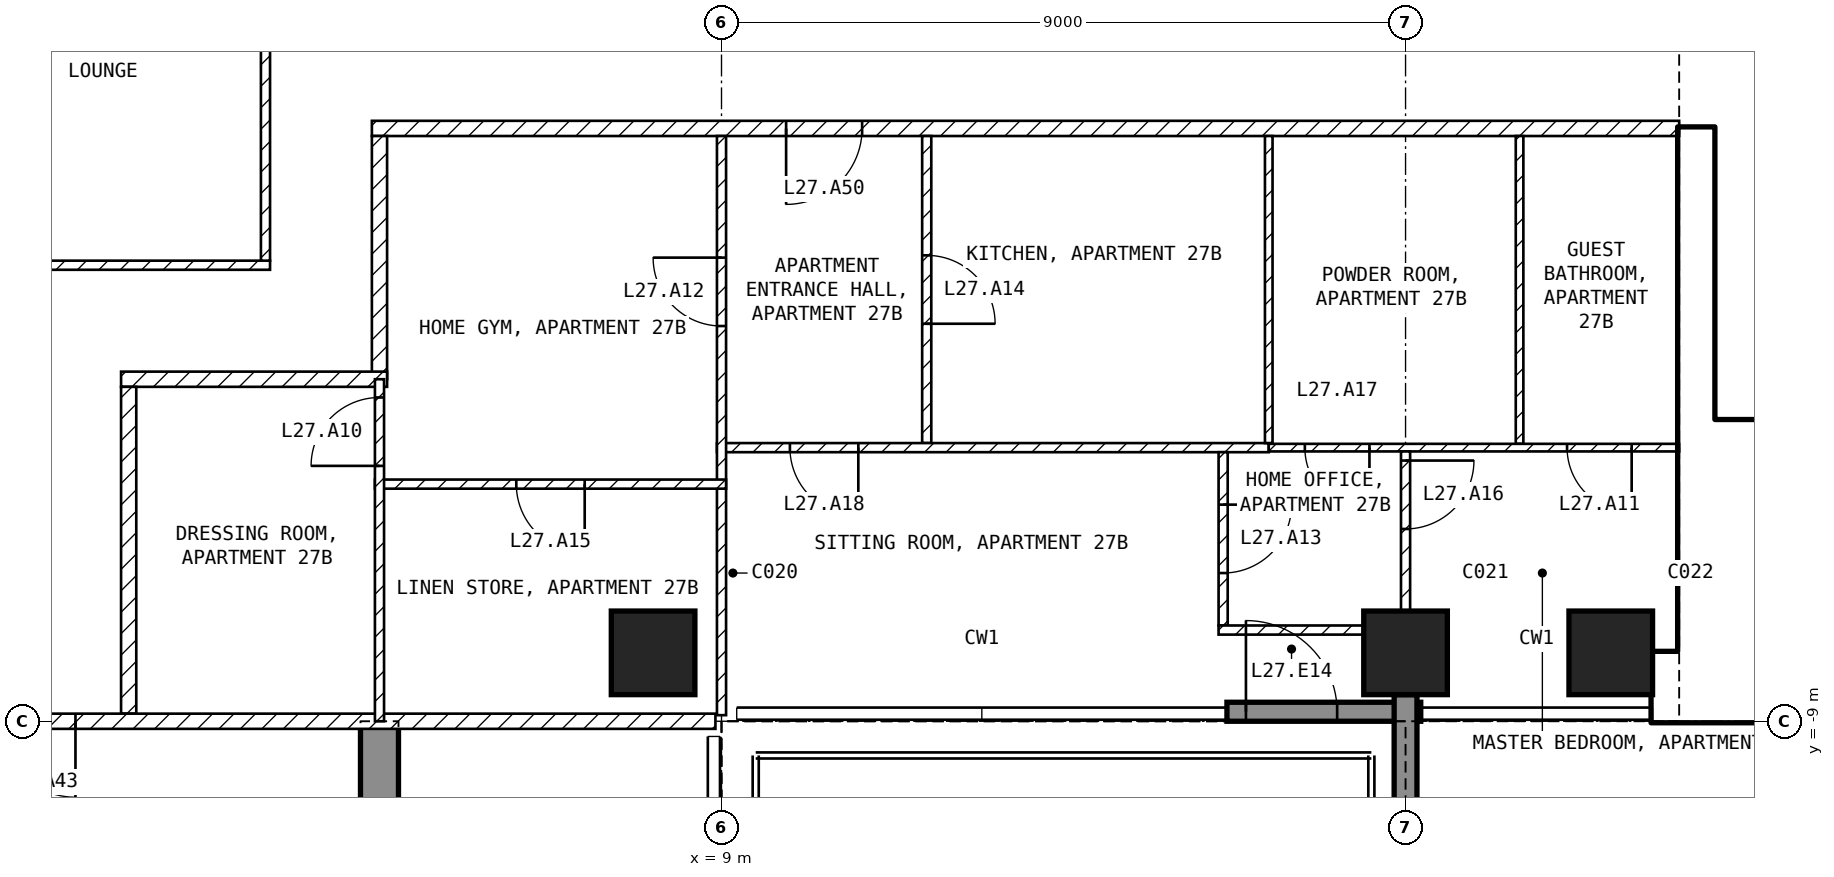
"""IFC4 building model, lengths in metres.
Left out: names, types, materials, properties, quantities, classifications, styles, units other than length and angle.
Written with IfcOpenShell. Run it as: python <this file> out.ifc"""

import sys

from ifc_helpers import new_model, si_unit, direction, frame, frame_2d, origin, origin_2d, place, context, subcontext, project, spatial, polyline, rectangle, outline, extrude, element, fill, save


model = new_model("IFC4")
c1 = context("Model", 3, precision=1e-05, world=origin(), true_north=direction((0.0, 1.0)))
c2 = subcontext(c1, "Body", "Model", "MODEL_VIEW")
j1 = project(units=[si_unit("LENGTHUNIT", "METRE"), si_unit("PLANEANGLEUNIT", "RADIAN")], contexts=[c1])
p1 = place(None, origin())
s1 = spatial("IfcSite", under=j1, at=p1, CompositionType="ELEMENT")
p2 = place(p1, origin())
s2 = spatial("IfcBuilding", under=s1, at=p2, CompositionType="ELEMENT")
p3 = place(p2, frame((0.0, 0.0, 116.4)))
s3 = spatial("IfcBuildingStorey", under=s2, at=p3, CompositionType="ELEMENT", Elevation=116.4)
for number, where, z_axis, x_axis in (
    (1, (8.1, -8.1, -0.25), (0.0, 0.0, 1.0), (1.0, 0.0, 0.0)),
    (2, (18.0, -8.1, -0.25), (0.0, 0.0, 1.0), (1.0, 0.0, 0.0)),
    (3, (20.7, -8.1, -0.25), (0.0, 0.0, 1.0), (1.0, 0.0, 0.0)),
):
    element("IfcColumn", number, at=place(p3, frame(where, z_axis=z_axis, x_axis=x_axis)), inside=s3, PredefinedType="COLUMN", context=c2, shape_type="SweptSolid", body=[
        extrude(rectangle(XDim=1.1, YDim=1.1, at=origin_2d()), origin(), (0.0, 0.0, 1.0), 3.5),
    ])
p4 = place(p3, frame((4.25, -20.15, -0.25), z_axis=(1.0, 0.0, 0.0), x_axis=(0.0, 1.0, 0.0)))
e4 = element("IfcWall", 4, at=p4, inside=s3, PredefinedType="SHEAR", context=c2, shape_type="SweptSolid", body=[
    extrude(outline(polyline([(0.0, 0.0), (6.65, 0.0), (6.65, 2.65), (9.05, 2.65), (9.05, 0.0), (11.15, 0.0), (11.15, 3.5), (0.0, 3.5), (0.0, 0.0)])), origin(), (0.0, 0.0, 1.0), 0.5),
])
p5 = place(p3, frame((15.65, -8.875, 0.0), z_axis=(0.0, 0.0, 1.0), x_axis=(1.0, 0.0, 0.0)))
e5 = element("IfcWall", 5, at=p5, inside=s3, PredefinedType="SOLIDWALL", context=c2, shape_type="SweptSolid", body=[
    extrude(rectangle(XDim=2.55, YDim=0.25, at=frame_2d((1.275, 0.0))), origin(), (0.0, 0.0, 1.0), 3.25),
])
p6 = place(p5, frame((0.25, 0.0, 0.0)))
e6 = element("IfcOpeningElement", 6, at=p6, cuts=e5, PredefinedType="OPENING", context=c2, shape_type="SweptSolid", body=[
    extrude(rectangle(XDim=1.2, YDim=2.4, at=frame_2d((0.6, 1.2))), frame((0.0, 0.135, 0.0), z_axis=(0.0, -1.0, 0.0), x_axis=(1.0, 0.0, 0.0)), (0.0, 0.0, 1.0), 0.27),
])
p7 = place(p3, frame((18.0, -8.65, 0.0), z_axis=(0.0, 0.0, 1.0), x_axis=(0.0, -1.0, 0.0)))
e7 = element("IfcWall", 7, at=p7, inside=s3, PredefinedType="SOLIDWALL", context=c2, shape_type="SweptSolid", body=[
    extrude(rectangle(XDim=3.09, YDim=0.3, at=frame_2d((1.545, 0.0))), origin(), (0.0, 0.0, 1.0), 3.25),
])
p8 = place(p3, frame((21.25, -8.55, 0.0), z_axis=(0.0, 0.0, 1.0), x_axis=(1.0, 0.0, 0.0)))
e8 = element("IfcWall", 8, at=p8, inside=s3, PredefinedType="SHEAR", context=c2, shape_type="SweptSolid", body=[
    extrude(rectangle(XDim=8.95, YDim=0.9, at=frame_2d((4.475, 0.0))), origin(), (0.0, 0.0, 1.0), 3.25),
])
p9 = place(p3, frame((21.825, -8.1, 0.0), z_axis=(0.0, 0.0, 1.0), x_axis=(0.0, 1.0, 0.0)))
e9 = element("IfcWall", 9, at=p9, inside=s3, PredefinedType="SHEAR", context=c2, shape_type="SweptSolid", body=[
    extrude(rectangle(XDim=6.9, YDim=0.45, at=frame_2d((3.45, 0.0))), origin(), (0.0, 0.0, 1.0), 3.25),
])
p10 = place(p3, frame((22.05, -5.15, 0.0), z_axis=(0.0, 0.0, 1.0), x_axis=(1.0, 0.0, 0.0)))
e10 = element("IfcWall", 10, at=p10, inside=s3, PredefinedType="SOLIDWALL", context=c2, shape_type="SweptSolid", body=[
    extrude(rectangle(XDim=6.3, YDim=0.2, at=frame_2d((3.15, 0.0))), origin(), (0.0, 0.0, 1.0), 3.25),
])
p11 = place(p10, frame((0.2, 0.0, 0.0)))
e11 = element("IfcOpeningElement", 11, at=p11, cuts=e10, PredefinedType="OPENING", context=c2, shape_type="SweptSolid", body=[
    extrude(rectangle(XDim=1.0, YDim=2.1, at=frame_2d((0.5, 1.05))), frame((0.0, 0.11, 0.0), z_axis=(0.0, -1.0, 0.0), x_axis=(1.0, 0.0, 0.0)), (0.0, 0.0, 1.0), 0.22),
])
p12 = place(p3, frame((-3.06, -3.0, 0.0), z_axis=(0.0, 0.0, 1.0), x_axis=(1.0, 0.0, 0.0)))
e12 = element("IfcWall", 12, at=p12, inside=s3, PredefinedType="PARTITIONING", context=c2, shape_type="SweptSolid", body=[
    extrude(rectangle(XDim=6.12, YDim=0.12, at=frame_2d((3.06, 0.0))), origin(), (0.0, 0.0, 1.0), 3.25),
])
p13 = place(p3, frame((3.0, -2.94, 0.0), z_axis=(0.0, 0.0, 1.0), x_axis=(0.0, 1.0, 0.0)))
e13 = element("IfcWall", 13, at=p13, inside=s3, PredefinedType="PARTITIONING", context=c2, shape_type="SweptSolid", body=[
    extrude(rectangle(XDim=5.88, YDim=0.12, at=frame_2d((2.94, 0.0))), origin(), (0.0, 0.0, 1.0), 3.25),
])
p14 = place(p3, frame((21.6, -1.2, 0.0), z_axis=(0.0, 0.0, 1.0), x_axis=(-1.0, 0.0, 0.0)))
e14 = element("IfcWall", 14, at=p14, inside=s3, PredefinedType="PARTITIONING", context=c2, shape_type="SweptSolid", body=[
    extrude(rectangle(XDim=17.2, YDim=0.2, at=frame_2d((8.6, 0.0))), origin(), (0.0, 0.0, 1.0), 3.25),
])
p15 = place(p14, frame((10.75, 0.0, 0.0)))
e15 = element("IfcOpeningElement", 15, at=p15, cuts=e14, PredefinedType="OPENING", context=c2, shape_type="SweptSolid", body=[
    extrude(rectangle(XDim=1.0, YDim=2.1, at=frame_2d((0.5, 1.05))), frame((0.0, 0.11, 0.0), z_axis=(0.0, -1.0, 0.0), x_axis=(1.0, 0.0, 0.0)), (0.0, 0.0, 1.0), 0.22),
])
p16 = place(p3, frame((4.5, -1.3, 0.0), z_axis=(0.0, 0.0, 1.0), x_axis=(0.0, -1.0, 0.0)))
e16 = element("IfcWall", 16, at=p16, inside=s3, PredefinedType="PARTITIONING", context=c2, shape_type="SweptSolid", body=[
    extrude(rectangle(XDim=3.2, YDim=0.2, at=frame_2d((1.6, 0.0))), origin(), (0.0, 0.0, 1.0), 3.25),
])
p17 = place(p3, frame((4.6, -4.5, 0.0), z_axis=(0.0, 0.0, 1.0), x_axis=(-1.0, 0.0, 0.0)))
e17 = element("IfcWall", 17, at=p17, inside=s3, PredefinedType="PARTITIONING", context=c2, shape_type="SweptSolid", body=[
    extrude(rectangle(XDim=3.5, YDim=0.2, at=frame_2d((1.75, 0.0))), origin(), (0.0, 0.0, 1.0), 3.25),
])
p18 = place(p3, frame((1.2, -4.6, 0.0), z_axis=(0.0, 0.0, 1.0), x_axis=(0.0, -1.0, 0.0)))
e18 = element("IfcWall", 18, at=p18, inside=s3, PredefinedType="PARTITIONING", context=c2, shape_type="SweptSolid", body=[
    extrude(rectangle(XDim=4.3, YDim=0.2, at=frame_2d((2.15, 0.0))), origin(), (0.0, 0.0, 1.0), 3.25),
])
p19 = place(p3, frame((8.92, -9.0, 0.0), z_axis=(0.0, 0.0, 1.0), x_axis=(-1.0, 0.0, 0.0)))
e19 = element("IfcWall", 19, at=p19, inside=s3, PredefinedType="PARTITIONING", context=c2, shape_type="SweptSolid", body=[
    extrude(rectangle(XDim=17.84, YDim=0.2, at=frame_2d((8.92, 0.0))), origin(), (0.0, 0.0, 1.0), 3.25),
])
p20 = place(p19, frame((8.42, 0.0, 0.0)))
e20 = element("IfcOpeningElement", 20, at=p20, cuts=e19, PredefinedType="OPENING", context=c2, shape_type="SweptSolid", body=[
    extrude(rectangle(XDim=1.0, YDim=2.1, at=frame_2d((0.5, 1.05))), frame((0.0, 0.11, 0.0), z_axis=(0.0, -1.0, 0.0), x_axis=(1.0, 0.0, 0.0)), (0.0, 0.0, 1.0), 0.22),
])
p21 = place(p3, frame((11.7, -1.3, 0.0), z_axis=(0.0, 0.0, 1.0), x_axis=(0.0, -1.0, 0.0)))
e21 = element("IfcWall", 21, at=p21, inside=s3, PredefinedType="PARTITIONING", context=c2, shape_type="SweptSolid", body=[
    extrude(rectangle(XDim=4.04, YDim=0.12, at=frame_2d((2.02, 0.0))), origin(), (0.0, 0.0, 1.0), 3.25),
])
p22 = place(p21, frame((1.57, 0.0, 0.0)))
e22 = element("IfcOpeningElement", 22, at=p22, cuts=e21, PredefinedType="OPENING", context=c2, shape_type="SweptSolid", body=[
    extrude(rectangle(XDim=0.9, YDim=2.1, at=frame_2d((0.45, 1.05))), frame((0.0, 0.07, 0.0), z_axis=(0.0, -1.0, 0.0), x_axis=(1.0, 0.0, 0.0)), (0.0, 0.0, 1.0), 0.14),
])
p23 = place(p3, frame((16.2, -5.4, 0.0), z_axis=(0.0, 0.0, 1.0), x_axis=(-1.0, 0.0, 0.0)))
e23 = element("IfcWall", 23, at=p23, inside=s3, PredefinedType="PARTITIONING", context=c2, shape_type="SweptSolid", body=[
    extrude(rectangle(XDim=7.26, YDim=0.12, at=frame_2d((3.63, 0.0))), origin(), (0.0, 0.0, 1.0), 3.25),
])
p24 = place(p23, frame((5.4, 0.0, 0.0)))
e24 = element("IfcOpeningElement", 24, at=p24, cuts=e23, PredefinedType="OPENING", context=c2, shape_type="SweptSolid", body=[
    extrude(rectangle(XDim=0.9, YDim=2.1, at=frame_2d((0.45, 1.05))), frame((0.0, 0.07, 0.0), z_axis=(0.0, -1.0, 0.0), x_axis=(1.0, 0.0, 0.0)), (0.0, 0.0, 1.0), 0.14),
])
p25 = place(p3, frame((9.0, -8.92, 0.0), z_axis=(0.0, 0.0, 1.0), x_axis=(0.0, 1.0, 0.0)))
e25 = element("IfcWall", 25, at=p25, inside=s3, PredefinedType="PARTITIONING", context=c2, shape_type="SweptSolid", body=[
    extrude(rectangle(XDim=7.62, YDim=0.12, at=frame_2d((3.81, 0.0))), origin(), (0.0, 0.0, 1.0), 3.25),
])
p26 = place(p25, frame((5.12, 0.0, 0.0)))
e26 = element("IfcOpeningElement", 26, at=p26, cuts=e25, PredefinedType="OPENING", context=c2, shape_type="SweptSolid", body=[
    extrude(rectangle(XDim=0.9, YDim=2.1, at=frame_2d((0.45, 1.05))), frame((0.0, 0.07, 0.0), z_axis=(0.0, -1.0, 0.0), x_axis=(1.0, 0.0, 0.0)), (0.0, 0.0, 1.0), 0.14),
])
p27 = place(p3, frame((16.2, -1.3, 0.0), z_axis=(0.0, 0.0, 1.0), x_axis=(0.0, -1.0, 0.0)))
e27 = element("IfcWall", 27, at=p27, inside=s3, PredefinedType="PARTITIONING", context=c2, shape_type="SweptSolid", body=[
    extrude(rectangle(XDim=4.04, YDim=0.1, at=frame_2d((2.02, 0.0))), origin(), (0.0, 0.0, 1.0), 3.25),
])
p28 = place(p3, frame((19.5, -1.3, 0.0), z_axis=(0.0, 0.0, 1.0), x_axis=(0.0, -1.0, 0.0)))
e28 = element("IfcWall", 28, at=p28, inside=s3, PredefinedType="PARTITIONING", context=c2, shape_type="SweptSolid", body=[
    extrude(rectangle(XDim=4.05, YDim=0.1, at=frame_2d((2.025, 0.0))), origin(), (0.0, 0.0, 1.0), 3.25),
])
p29 = place(p3, frame((21.6, -5.4, 0.0), z_axis=(0.0, 0.0, 1.0), x_axis=(-1.0, 0.0, 0.0)))
e29 = element("IfcWall", 29, at=p29, inside=s3, PredefinedType="PARTITIONING", context=c2, shape_type="SweptSolid", body=[
    extrude(rectangle(XDim=5.4, YDim=0.1, at=frame_2d((2.7, 0.0))), origin(), (0.0, 0.0, 1.0), 3.25),
])
p30 = place(p29, frame((0.625, 0.0, 0.0)))
e30 = element("IfcOpeningElement", 30, at=p30, cuts=e29, PredefinedType="OPENING", context=c2, shape_type="SweptSolid", body=[
    extrude(rectangle(XDim=0.85, YDim=2.1, at=frame_2d((0.425, 1.05))), frame((0.0, 0.06, 0.0), z_axis=(0.0, -1.0, 0.0), x_axis=(1.0, 0.0, 0.0)), (0.0, 0.0, 1.0), 0.12),
])
p31 = place(p29, frame((4.075, 0.0, 0.0)))
e31 = element("IfcOpeningElement", 31, at=p31, cuts=e29, PredefinedType="OPENING", context=c2, shape_type="SweptSolid", body=[
    extrude(rectangle(XDim=0.85, YDim=2.1, at=frame_2d((0.425, 1.05))), frame((0.0, 0.06, 0.0), z_axis=(0.0, -1.0, 0.0), x_axis=(1.0, 0.0, 0.0)), (0.0, 0.0, 1.0), 0.12),
])
p32 = place(p3, frame((15.6, -5.46, 0.0), z_axis=(0.0, 0.0, 1.0), x_axis=(0.0, -1.0, 0.0)))
e32 = element("IfcWall", 32, at=p32, inside=s3, PredefinedType="PARTITIONING", context=c2, shape_type="SweptSolid", body=[
    extrude(rectangle(XDim=2.28, YDim=0.12, at=frame_2d((1.14, 0.0))), origin(), (0.0, 0.0, 1.0), 3.25),
])
p33 = place(p32, frame((0.69, 0.0, 0.0)))
e33 = element("IfcOpeningElement", 33, at=p33, cuts=e32, PredefinedType="OPENING", context=c2, shape_type="SweptSolid", body=[
    extrude(rectangle(XDim=0.9, YDim=2.1, at=frame_2d((0.45, 1.05))), frame((0.0, 0.07, 0.0), z_axis=(0.0, -1.0, 0.0), x_axis=(1.0, 0.0, 0.0)), (0.0, 0.0, 1.0), 0.14),
])
p34 = place(p3, frame((15.54, -7.8, 0.0), z_axis=(0.0, 0.0, 1.0), x_axis=(1.0, 0.0, 0.0)))
e34 = element("IfcWall", 34, at=p34, inside=s3, PredefinedType="PARTITIONING", context=c2, shape_type="SweptSolid", body=[
    extrude(rectangle(XDim=1.91, YDim=0.12, at=frame_2d((0.955, 0.0))), origin(), (0.0, 0.0, 1.0), 3.25),
])
p35 = place(p3, frame((18.0, -5.45, 0.0), z_axis=(0.0, 0.0, 1.0), x_axis=(0.0, -1.0, 0.0)))
e35 = element("IfcWall", 35, at=p35, inside=s3, PredefinedType="PARTITIONING", context=c2, shape_type="SweptSolid", body=[
    extrude(rectangle(XDim=2.1, YDim=0.12, at=frame_2d((1.05, 0.0))), origin(), (0.0, 0.0, 1.0), 2.414),
])
p36 = place(p35, frame((0.12, 0.0, 0.0)))
e36 = element("IfcOpeningElement", 36, at=p36, cuts=e35, PredefinedType="OPENING", context=c2, shape_type="SweptSolid", body=[
    extrude(rectangle(XDim=0.9, YDim=2.1, at=frame_2d((0.45, 1.05))), frame((0.0, 0.07, 0.0), z_axis=(0.0, -1.0, 0.0), x_axis=(1.0, 0.0, 0.0)), (0.0, 0.0, 1.0), 0.14),
])
p37 = place(p3, frame((9.06, -5.88, 0.0), z_axis=(0.0, 0.0, 1.0), x_axis=(-1.0, 0.0, 0.0)))
e37 = element("IfcWall", 37, at=p37, inside=s3, PredefinedType="PARTITIONING", context=c2, shape_type="SweptSolid", body=[
    extrude(rectangle(XDim=4.62, YDim=0.12, at=frame_2d((2.31, 0.0))), origin(), (0.0, 0.0, 1.0), 3.25),
])
p38 = place(p37, frame((1.86, 0.0, 0.0)))
e38 = element("IfcOpeningElement", 38, at=p38, cuts=e37, PredefinedType="OPENING", context=c2, shape_type="SweptSolid", body=[
    extrude(rectangle(XDim=0.9, YDim=2.1, at=frame_2d((0.45, 1.05))), frame((0.0, 0.07, 0.0), z_axis=(0.0, -1.0, 0.0), x_axis=(1.0, 0.0, 0.0)), (0.0, 0.0, 1.0), 0.14),
])
p39 = place(p3, frame((4.5, -9.0, 0.0), z_axis=(0.0, 0.0, 1.0), x_axis=(0.0, 1.0, 0.0)))
e39 = element("IfcWall", 39, at=p39, inside=s3, PredefinedType="PARTITIONING", context=c2, shape_type="SweptSolid", body=[
    extrude(rectangle(XDim=4.5, YDim=0.12, at=frame_2d((2.25, 0.0))), origin(), (0.0, 0.0, 1.0), 3.25),
])
p40 = place(p39, frame((3.36, 0.0, 0.0)))
e40 = element("IfcOpeningElement", 40, at=p40, cuts=e39, PredefinedType="OPENING", context=c2, shape_type="SweptSolid", body=[
    extrude(rectangle(XDim=0.9, YDim=2.1, at=frame_2d((0.45, 1.05))), frame((0.0, 0.07, 0.0), z_axis=(0.0, -1.0, 0.0), x_axis=(1.0, 0.0, 0.0)), (0.0, 0.0, 1.0), 0.14),
])
p41 = place(p6, origin())
e41 = element("IfcDoor", 41, at=p41, inside=s3, OperationType="SINGLE_SWING_LEFT", PredefinedType="DOOR", context=c2, shape_type="SweptSolid", body=[
    extrude(rectangle(XDim=1.2, YDim=2.4, at=frame_2d((0.6, 1.2))), frame((0.0, 0.025, 0.0), z_axis=(0.0, -1.0, 0.0), x_axis=(1.0, 0.0, 0.0)), (0.0, 0.0, 1.0), 0.05),
])
fill(e6, e41)
p42 = place(p11, origin())
e42 = element("IfcDoor", 42, at=p42, inside=s3, OperationType="SINGLE_SWING_LEFT", PredefinedType="DOOR", context=c2, shape_type="SweptSolid", body=[
    extrude(rectangle(XDim=1.0, YDim=2.1, at=frame_2d((0.5, 1.05))), frame((0.0, 0.025, 0.0), z_axis=(0.0, -1.0, 0.0), x_axis=(1.0, 0.0, 0.0)), (0.0, 0.0, 1.0), 0.05),
])
fill(e11, e42)
p43 = place(p40, origin())
e43 = element("IfcDoor", 43, at=p43, inside=s3, OperationType="SINGLE_SWING_LEFT", PredefinedType="DOOR", context=c2, shape_type="SweptSolid", body=[
    extrude(rectangle(XDim=0.9, YDim=2.1, at=frame_2d((0.45, 1.05))), frame((0.0, 0.025, 0.0), z_axis=(0.0, -1.0, 0.0), x_axis=(1.0, 0.0, 0.0)), (0.0, 0.0, 1.0), 0.05),
])
fill(e40, e43)
p44 = place(p30, origin())
e44 = element("IfcDoor", 44, at=p44, inside=s3, OperationType="SINGLE_SWING_LEFT", PredefinedType="DOOR", context=c2, shape_type="SweptSolid", body=[
    extrude(rectangle(XDim=0.85, YDim=2.1, at=frame_2d((0.425, 1.05))), frame((0.0, 0.025, 0.0), z_axis=(0.0, -1.0, 0.0), x_axis=(1.0, 0.0, 0.0)), (0.0, 0.0, 1.0), 0.05),
])
fill(e30, e44)
p45 = place(p26, origin())
e45 = element("IfcDoor", 45, at=p45, inside=s3, OperationType="SINGLE_SWING_RIGHT", PredefinedType="DOOR", context=c2, shape_type="SweptSolid", body=[
    extrude(rectangle(XDim=0.9, YDim=2.1, at=frame_2d((0.45, 1.05))), frame((0.0, 0.025, 0.0), z_axis=(0.0, -1.0, 0.0), x_axis=(1.0, 0.0, 0.0)), (0.0, 0.0, 1.0), 0.05),
])
fill(e26, e45)
p46 = place(p33, origin())
e46 = element("IfcDoor", 46, at=p46, inside=s3, OperationType="SINGLE_SWING_LEFT", PredefinedType="DOOR", context=c2, shape_type="SweptSolid", body=[
    extrude(rectangle(XDim=0.9, YDim=2.1, at=frame_2d((0.45, 1.05))), frame((0.0, 0.025, 0.0), z_axis=(0.0, -1.0, 0.0), x_axis=(1.0, 0.0, 0.0)), (0.0, 0.0, 1.0), 0.05),
])
fill(e33, e46)
p47 = place(p22, origin())
e47 = element("IfcDoor", 47, at=p47, inside=s3, OperationType="SINGLE_SWING_RIGHT", PredefinedType="DOOR", context=c2, shape_type="SweptSolid", body=[
    extrude(rectangle(XDim=0.9, YDim=2.1, at=frame_2d((0.45, 1.05))), frame((0.0, 0.025, 0.0), z_axis=(0.0, -1.0, 0.0), x_axis=(1.0, 0.0, 0.0)), (0.0, 0.0, 1.0), 0.05),
])
fill(e22, e47)
p48 = place(p38, origin())
e48 = element("IfcDoor", 48, at=p48, inside=s3, OperationType="SINGLE_SWING_LEFT", PredefinedType="DOOR", context=c2, shape_type="SweptSolid", body=[
    extrude(rectangle(XDim=0.9, YDim=2.1, at=frame_2d((0.45, 1.05))), frame((0.0, 0.025, 0.0), z_axis=(0.0, -1.0, 0.0), x_axis=(1.0, 0.0, 0.0)), (0.0, 0.0, 1.0), 0.05),
])
fill(e38, e48)
p49 = place(p36, origin())
e49 = element("IfcDoor", 49, at=p49, inside=s3, OperationType="SINGLE_SWING_LEFT", PredefinedType="DOOR", context=c2, shape_type="SweptSolid", body=[
    extrude(rectangle(XDim=0.9, YDim=2.1, at=frame_2d((0.45, 1.05))), frame((0.0, 0.025, 0.0), z_axis=(0.0, -1.0, 0.0), x_axis=(1.0, 0.0, 0.0)), (0.0, 0.0, 1.0), 0.05),
])
fill(e36, e49)
p50 = place(p31, origin())
e50 = element("IfcDoor", 50, at=p50, inside=s3, OperationType="SINGLE_SWING_LEFT", PredefinedType="DOOR", context=c2, shape_type="SweptSolid", body=[
    extrude(rectangle(XDim=0.85, YDim=2.1, at=frame_2d((0.425, 1.05))), frame((0.0, 0.025, 0.0), z_axis=(0.0, -1.0, 0.0), x_axis=(1.0, 0.0, 0.0)), (0.0, 0.0, 1.0), 0.05),
])
fill(e31, e50)
p51 = place(p24, origin())
e51 = element("IfcDoor", 51, at=p51, inside=s3, OperationType="SINGLE_SWING_LEFT", PredefinedType="DOOR", context=c2, shape_type="SweptSolid", body=[
    extrude(rectangle(XDim=0.9, YDim=2.1, at=frame_2d((0.45, 1.05))), frame((0.0, 0.025, 0.0), z_axis=(0.0, -1.0, 0.0), x_axis=(1.0, 0.0, 0.0)), (0.0, 0.0, 1.0), 0.05),
])
fill(e24, e51)
p52 = place(p20, origin())
e52 = element("IfcDoor", 52, at=p52, inside=s3, OperationType="SINGLE_SWING_LEFT", PredefinedType="DOOR", context=c2, shape_type="SweptSolid", body=[
    extrude(rectangle(XDim=1.0, YDim=2.1, at=frame_2d((0.5, 1.05))), frame((0.0, 0.025, 0.0), z_axis=(0.0, -1.0, 0.0), x_axis=(1.0, 0.0, 0.0)), (0.0, 0.0, 1.0), 0.05),
])
fill(e20, e52)
p53 = place(p15, origin())
e53 = element("IfcDoor", 53, at=p53, inside=s3, OperationType="SINGLE_SWING_RIGHT", PredefinedType="DOOR", context=c2, shape_type="SweptSolid", body=[
    extrude(rectangle(XDim=1.0, YDim=2.1, at=frame_2d((0.5, 1.05))), frame((0.0, 0.025, 0.0), z_axis=(0.0, -1.0, 0.0), x_axis=(1.0, 0.0, 0.0)), (0.0, 0.0, 1.0), 0.05),
])
fill(e15, e53)
save(model, sys.argv[1])
